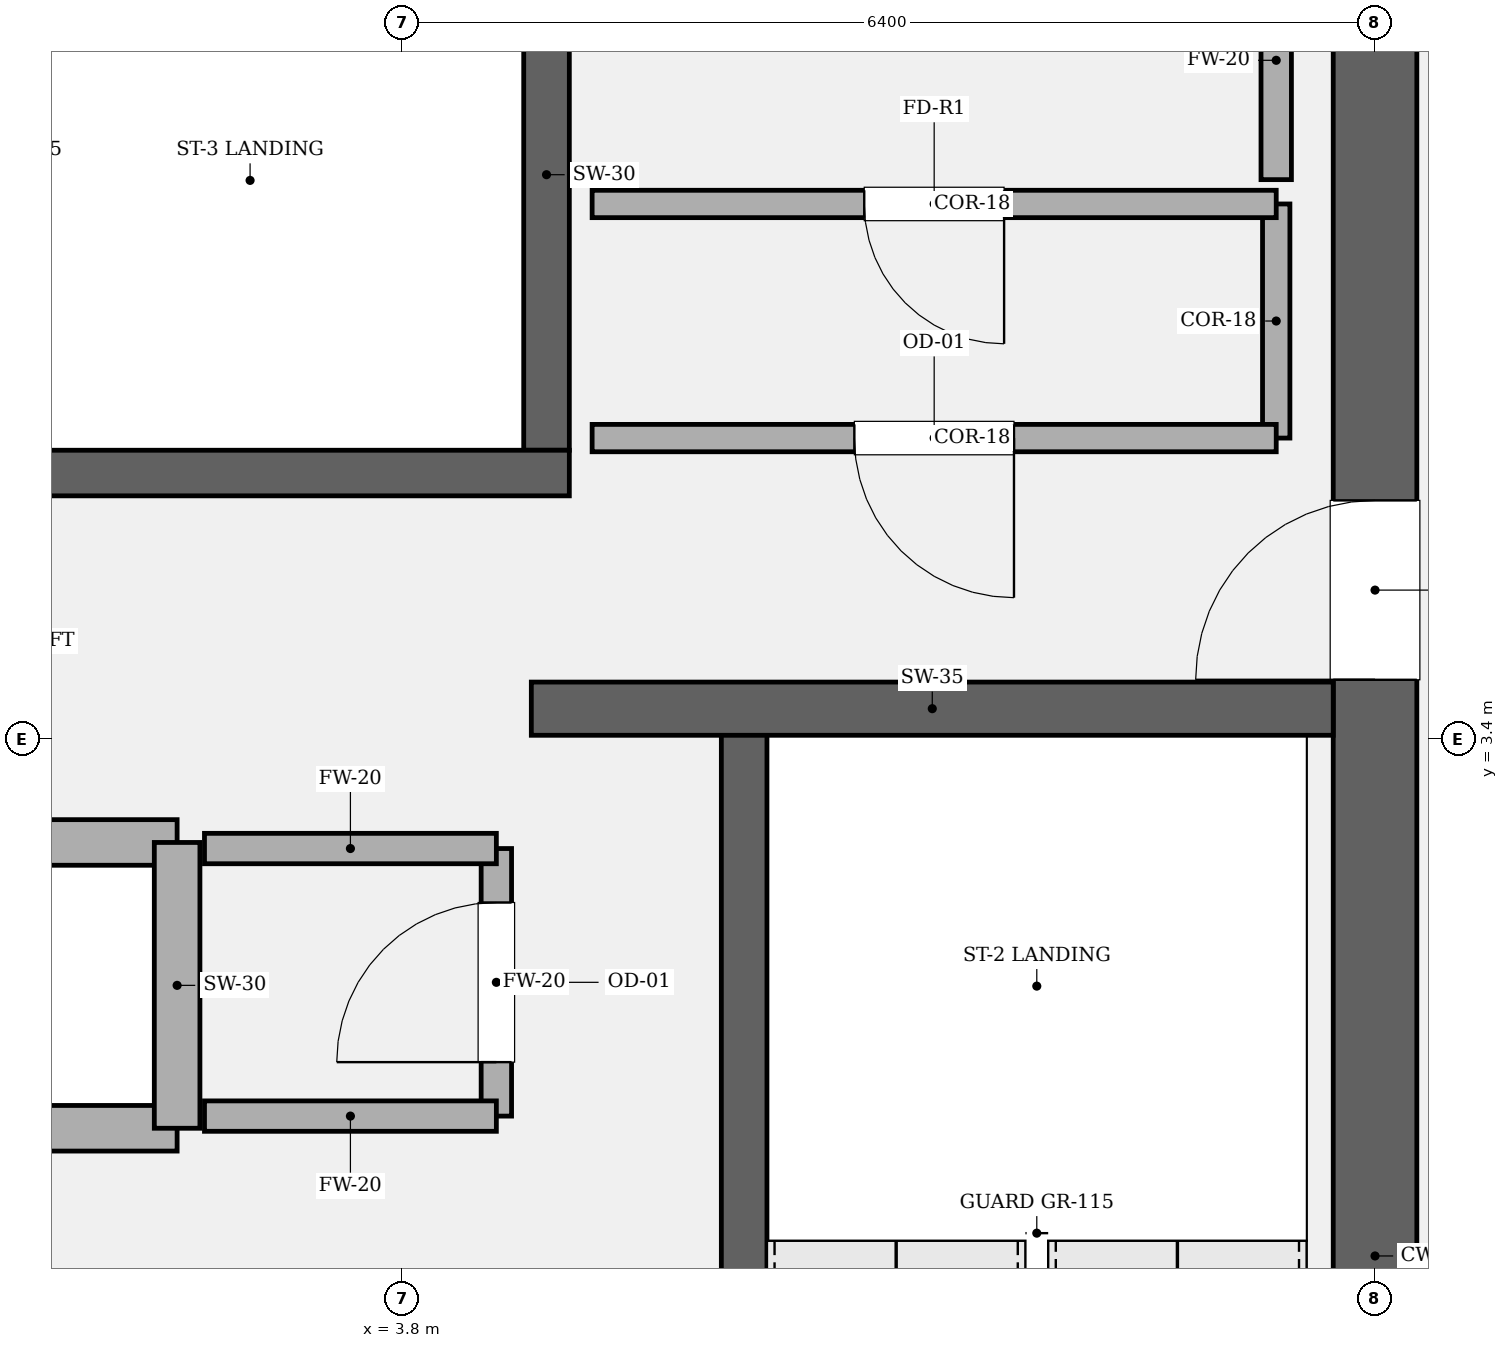
"""IFC4 building model, lengths in metres.
Left out: names, types, materials, properties, quantities, classifications, styles, units other than length and angle.
Written with IfcOpenShell. Run it as: python <this file> out.ifc"""

import sys

from ifc_helpers import new_model, si_unit, direction, frame, frame_2d, origin, place, context, subcontext, project, spatial, rectangle, extrude, element, fill, save


model = new_model("IFC4")
c1 = context("Model", 3, precision=1e-05, world=origin(), true_north=direction((0.0, 1.0)))
c2 = subcontext(c1, "Body", "Model", "MODEL_VIEW")
j1 = project(units=[si_unit("LENGTHUNIT", "METRE"), si_unit("PLANEANGLEUNIT", "RADIAN")], contexts=[c1])
p1 = place(None, origin())
s1 = spatial("IfcSite", under=j1, at=p1, CompositionType="ELEMENT")
p2 = place(p1, origin())
s2 = spatial("IfcBuilding", under=s1, at=p2, CompositionType="ELEMENT")
p3 = place(p2, frame((0.0, 0.0, 271.65)))
s3 = spatial("IfcBuildingStorey", under=s2, at=p3, CompositionType="ELEMENT", Elevation=271.65)
p4 = place(p3, frame((10.2, 8.925, 0.0), z_axis=(0.0, 0.0, 1.0), x_axis=(0.0, -1.0, 0.0)))
e1 = element("IfcWall", 1, at=p4, inside=s3, PredefinedType="SHEAR", context=c2, shape_type="SweptSolid", body=[
    extrude(rectangle(XDim=17.85, YDim=0.55, at=frame_2d((8.925, 0.0))), origin(), (0.0, 0.0, 1.0), 4.05),
])
p5 = place(p4, frame((3.955, 0.0, 0.0)))
e2 = element("IfcOpeningElement", 2, at=p5, cuts=e1, PredefinedType="OPENING", context=c2, shape_type="SweptSolid", body=[
    extrude(rectangle(XDim=1.18, YDim=2.2, at=frame_2d((0.59, 1.1))), frame((0.0, 0.285, 0.0), z_axis=(0.0, -1.0, 0.0), x_axis=(1.0, 0.0, 0.0)), (0.0, 0.0, 1.0), 0.57),
])
p6 = place(p3, frame((6.05, 3.45, 0.0), z_axis=(0.0, 0.0, 1.0), x_axis=(0.0, -1.0, 0.0)))
e3 = element("IfcWall", 3, at=p6, inside=s3, PredefinedType="SOLIDWALL", context=c2, shape_type="SweptSolid", body=[
    extrude(rectangle(XDim=8.95, YDim=0.3, at=frame_2d((4.475, 0.0))), origin(), (0.0, 0.0, 1.0), 4.05),
])
p7 = place(p3, frame((4.75, 8.925, 0.0), z_axis=(0.0, 0.0, 1.0), x_axis=(0.0, -1.0, 0.0)))
e4 = element("IfcWall", 4, at=p7, inside=s3, PredefinedType="SOLIDWALL", context=c2, shape_type="SweptSolid", body=[
    extrude(rectangle(XDim=3.625, YDim=0.3, at=frame_2d((1.812, 0.0))), origin(), (0.0, 0.0, 1.0), 4.05),
])
p8 = place(p3, frame((-4.9, 5.15, 0.0), z_axis=(0.0, 0.0, 1.0), x_axis=(1.0, 0.0, 0.0)))
e5 = element("IfcWall", 5, at=p8, inside=s3, PredefinedType="SOLIDWALL", context=c2, shape_type="SweptSolid", body=[
    extrude(rectangle(XDim=9.8, YDim=0.3, at=frame_2d((4.9, 0.0))), origin(), (0.0, 0.0, 1.0), 4.05),
])
p9 = place(p8, frame((0.56, 0.0, 0.0)))
e6 = element("IfcOpeningElement", 6, at=p9, cuts=e5, PredefinedType="OPENING", context=c2, shape_type="SweptSolid", body=[
    extrude(rectangle(XDim=1.18, YDim=2.2, at=frame_2d((0.59, 1.1))), frame((0.0, 0.16, 0.0), z_axis=(0.0, -1.0, 0.0), x_axis=(1.0, 0.0, 0.0)), (0.0, 0.0, 1.0), 0.32),
])
p10 = place(p3, frame((4.65, 3.6, 0.0), z_axis=(0.0, 0.0, 1.0), x_axis=(1.0, 0.0, 0.0)))
e7 = element("IfcWall", 7, at=p10, inside=s3, PredefinedType="SOLIDWALL", context=c2, shape_type="SweptSolid", body=[
    extrude(rectangle(XDim=5.275, YDim=0.35, at=frame_2d((2.638, 0.0))), origin(), (0.0, 0.0, 1.0), 4.05),
])
for number, where, z_axis, x_axis in (
    (8, (-2.32, 0.84, 0.0), (0.0, 0.0, 1.0), (1.0, 0.0, 0.0)),
    (9, (-2.32, 2.72, 0.0), (0.0, 0.0, 1.0), (1.0, 0.0, 0.0)),
):
    element("IfcWall", number, at=place(p3, frame(where, z_axis=z_axis, x_axis=x_axis)), inside=s3, PredefinedType="SOLIDWALL", context=c2, shape_type="SweptSolid", body=[
        extrude(rectangle(XDim=4.64, YDim=0.3, at=frame_2d((2.32, 0.0))), origin(), (0.0, 0.0, 1.0), 3.85),
    ])
p11 = place(p3, frame((2.32, 0.84, 0.0), z_axis=(0.0, 0.0, 1.0), x_axis=(0.0, 1.0, 0.0)))
e10 = element("IfcWall", 10, at=p11, inside=s3, PredefinedType="SOLIDWALL", context=c2, shape_type="SweptSolid", body=[
    extrude(rectangle(XDim=1.88, YDim=0.3, at=frame_2d((0.94, 0.0))), origin(), (0.0, 0.0, 1.0), 3.85),
])
p12 = place(p3, frame((4.42, 0.92, 0.0), z_axis=(0.0, 0.0, 1.0), x_axis=(0.0, 1.0, 0.0)))
e11 = element("IfcWall", 11, at=p12, inside=s3, PredefinedType="SOLIDWALL", context=c2, shape_type="SweptSolid", body=[
    extrude(rectangle(XDim=1.76, YDim=0.2, at=frame_2d((0.88, 0.0))), origin(), (0.0, 0.0, 1.0), 3.85),
])
p13 = place(p12, frame((0.355, 0.0, 0.0)))
e12 = element("IfcOpeningElement", 12, at=p13, cuts=e11, PredefinedType="OPENING", context=c2, shape_type="SweptSolid", body=[
    extrude(rectangle(XDim=1.05, YDim=2.2, at=frame_2d((0.525, 1.1))), frame((0.0, 0.11, 0.0), z_axis=(0.0, -1.0, 0.0), x_axis=(1.0, 0.0, 0.0)), (0.0, 0.0, 1.0), 0.22),
])
for number, where, z_axis, x_axis in (
    (13, (4.42, 2.68, 0.0), (0.0, 0.0, 1.0), (-1.0, 0.0, 0.0)),
    (14, (2.5, 0.92, 0.0), (0.0, 0.0, 1.0), (1.0, 0.0, 0.0)),
):
    element("IfcWall", number, at=place(p3, frame(where, z_axis=z_axis, x_axis=x_axis)), inside=s3, PredefinedType="SOLIDWALL", context=c2, shape_type="SweptSolid", body=[
        extrude(rectangle(XDim=1.92, YDim=0.2, at=frame_2d((0.96, 0.0))), origin(), (0.0, 0.0, 1.0), 3.85),
    ])
p14 = place(p3, frame((9.55, 5.38, 0.0), z_axis=(0.0, 0.0, 1.0), x_axis=(0.0, 1.0, 0.0)))
e15 = element("IfcWall", 15, at=p14, inside=s3, PredefinedType="PARTITIONING", context=c2, shape_type="SweptSolid", body=[
    extrude(rectangle(XDim=1.54, YDim=0.18, at=frame_2d((0.77, 0.0))), origin(), (0.0, 0.0, 1.0), 3.85),
])
p15 = place(p3, frame((9.55, 6.92, 0.0), z_axis=(0.0, 0.0, 1.0), x_axis=(-1.0, 0.0, 0.0)))
e16 = element("IfcWall", 16, at=p15, inside=s3, PredefinedType="PARTITIONING", context=c2, shape_type="SweptSolid", body=[
    extrude(rectangle(XDim=4.5, YDim=0.18, at=frame_2d((2.25, 0.0))), origin(), (0.0, 0.0, 1.0), 3.85),
])
p16 = place(p15, frame((1.79, 0.0, 0.0)))
e17 = element("IfcOpeningElement", 17, at=p16, cuts=e16, PredefinedType="OPENING", context=c2, shape_type="SweptSolid", body=[
    extrude(rectangle(XDim=0.92, YDim=2.1, at=frame_2d((0.46, 1.05))), frame((0.0, 0.1, 0.0), z_axis=(0.0, -1.0, 0.0), x_axis=(1.0, 0.0, 0.0)), (0.0, 0.0, 1.0), 0.2),
])
p17 = place(p3, frame((5.05, 5.38, 0.0), z_axis=(0.0, 0.0, 1.0), x_axis=(1.0, 0.0, 0.0)))
e18 = element("IfcWall", 18, at=p17, inside=s3, PredefinedType="PARTITIONING", context=c2, shape_type="SweptSolid", body=[
    extrude(rectangle(XDim=4.5, YDim=0.18, at=frame_2d((2.25, 0.0))), origin(), (0.0, 0.0, 1.0), 3.85),
])
p18 = place(p17, frame((1.725, 0.0, 0.0)))
e19 = element("IfcOpeningElement", 19, at=p18, cuts=e18, PredefinedType="OPENING", context=c2, shape_type="SweptSolid", body=[
    extrude(rectangle(XDim=1.05, YDim=2.2, at=frame_2d((0.525, 1.1))), frame((0.0, 0.1, 0.0), z_axis=(0.0, -1.0, 0.0), x_axis=(1.0, 0.0, 0.0)), (0.0, 0.0, 1.0), 0.2),
])
p19 = place(p3, frame((9.55, 7.08, 0.0), z_axis=(0.0, 0.0, 1.0), x_axis=(0.0, 1.0, 0.0)))
e20 = element("IfcWall", 20, at=p19, inside=s3, PredefinedType="SOLIDWALL", context=c2, shape_type="SweptSolid", body=[
    extrude(rectangle(XDim=1.57, YDim=0.2, at=frame_2d((0.785, 0.0))), origin(), (0.0, 0.0, 1.0), 3.85),
])
p20 = place(p5, origin())
e21 = element("IfcDoor", 21, at=p20, inside=s3, OperationType="SINGLE_SWING_RIGHT", PredefinedType="DOOR", context=c2, shape_type="SweptSolid", body=[
    extrude(rectangle(XDim=1.18, YDim=2.2, at=frame_2d((0.59, 1.1))), frame((0.0, 0.025, 0.0), z_axis=(0.0, -1.0, 0.0), x_axis=(1.0, 0.0, 0.0)), (0.0, 0.0, 1.0), 0.05),
])
fill(e2, e21)
p21 = place(p13, origin())
e22 = element("IfcDoor", 22, at=p21, inside=s3, OperationType="SINGLE_SWING_LEFT", PredefinedType="DOOR", context=c2, shape_type="SweptSolid", body=[
    extrude(rectangle(XDim=1.05, YDim=2.2, at=frame_2d((0.525, 1.1))), frame((0.0, 0.025, 0.0), z_axis=(0.0, -1.0, 0.0), x_axis=(1.0, 0.0, 0.0)), (0.0, 0.0, 1.0), 0.05),
])
fill(e12, e22)
p22 = place(p18, origin())
e23 = element("IfcDoor", 23, at=p22, inside=s3, OperationType="SINGLE_SWING_RIGHT", PredefinedType="DOOR", context=c2, shape_type="SweptSolid", body=[
    extrude(rectangle(XDim=1.05, YDim=2.2, at=frame_2d((0.525, 1.1))), frame((0.0, 0.025, 0.0), z_axis=(0.0, -1.0, 0.0), x_axis=(1.0, 0.0, 0.0)), (0.0, 0.0, 1.0), 0.05),
])
fill(e19, e23)
p23 = place(p16, origin())
e24 = element("IfcDoor", 24, at=p23, inside=s3, OperationType="SINGLE_SWING_LEFT", PredefinedType="DOOR", context=c2, shape_type="SweptSolid", body=[
    extrude(rectangle(XDim=0.92, YDim=2.1, at=frame_2d((0.46, 1.05))), frame((0.0, 0.025, 0.0), z_axis=(0.0, -1.0, 0.0), x_axis=(1.0, 0.0, 0.0)), (0.0, 0.0, 1.0), 0.05),
])
fill(e17, e24)
save(model, sys.argv[1])
